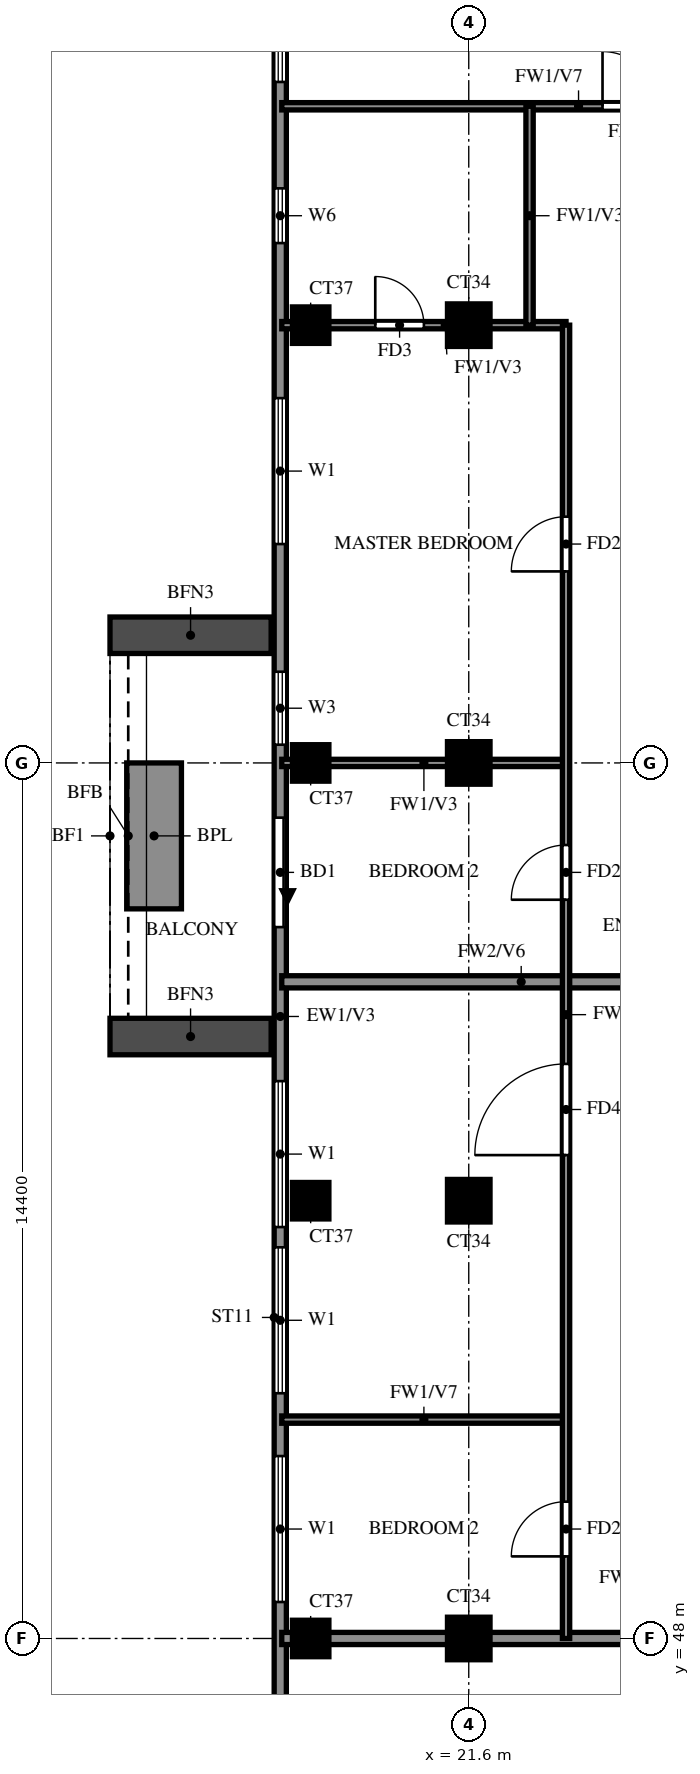
"""IFC4 building model, lengths in metres.
Left out: names, types, materials, properties, quantities, classifications, styles, units other than length and angle.
Written with IfcOpenShell. Run it as: python <this file> out.ifc"""

import sys

from ifc_helpers import new_model, si_unit, direction, frame, frame_2d, origin, origin_2d, place, context, subcontext, project, spatial, rectangle, extrude, source, transform, mapped, element, fill, save


model = new_model("IFC4")
c1 = context("Model", 3, precision=1e-05, world=origin(), true_north=direction((0.0, 1.0)))
c2 = subcontext(c1, "Body", "Model", "MODEL_VIEW")
j1 = project(units=[si_unit("LENGTHUNIT", "METRE"), si_unit("PLANEANGLEUNIT", "RADIAN")], contexts=[c1])
p1 = place(None, origin())
s1 = spatial("IfcSite", under=j1, at=p1, CompositionType="ELEMENT")
p2 = place(p1, origin())
s2 = spatial("IfcBuilding", under=s1, at=p2, CompositionType="ELEMENT")
p3 = place(p2, frame((0.0, 0.0, 253.5)))
s3 = spatial("IfcBuildingStorey", under=s2, at=p3, CompositionType="ELEMENT", Elevation=253.5)
m1 = source(origin(), c2, "Body", "SweptSolid", [
    extrude(rectangle(XDim=0.6, YDim=0.6, at=origin_2d()), origin(), (0.0, 0.0, 1.0), 3.22),
])
p4 = place(p3, frame((19.0, 48.0, 0.0), z_axis=(0.0, 0.0, 1.0), x_axis=(1.0, 0.0, 0.0)))
e1 = element("IfcColumn", 1, at=p4, inside=s3, PredefinedType="COLUMN", context=c2, shape_type="MappedRepresentation", body=[
    mapped(m1, transform((0.0, 0.0, 0.0))),
])
m2 = source(origin(), c2, "Body", "SweptSolid", [
    extrude(rectangle(XDim=0.7, YDim=0.7, at=origin_2d()), origin(), (0.0, 0.0, 1.0), 3.22),
])
p5 = place(p3, frame((21.6, 48.0, 0.0), z_axis=(0.0, 0.0, 1.0), x_axis=(1.0, 0.0, 0.0)))
e2 = element("IfcColumn", 2, at=p5, inside=s3, PredefinedType="COLUMN", context=c2, shape_type="MappedRepresentation", body=[
    mapped(m2, transform((0.0, 0.0, 0.0))),
])
p6 = place(p3, frame((19.0, 55.2, 0.0), z_axis=(0.0, 0.0, 1.0), x_axis=(1.0, 0.0, 0.0)))
e3 = element("IfcColumn", 3, at=p6, inside=s3, PredefinedType="COLUMN", context=c2, shape_type="MappedRepresentation", body=[
    mapped(m1, transform((0.0, 0.0, 0.0))),
])
p7 = place(p3, frame((21.6, 55.2, 0.0), z_axis=(0.0, 0.0, 1.0), x_axis=(1.0, 0.0, 0.0)))
e4 = element("IfcColumn", 4, at=p7, inside=s3, PredefinedType="COLUMN", context=c2, shape_type="MappedRepresentation", body=[
    mapped(m2, transform((0.0, 0.0, 0.0))),
])
p8 = place(p3, frame((19.0, 62.4, 0.0), z_axis=(0.0, 0.0, 1.0), x_axis=(1.0, 0.0, 0.0)))
e5 = element("IfcColumn", 5, at=p8, inside=s3, PredefinedType="COLUMN", context=c2, shape_type="MappedRepresentation", body=[
    mapped(m1, transform((0.0, 0.0, 0.0))),
])
p9 = place(p3, frame((21.6, 62.4, 0.0), z_axis=(0.0, 0.0, 1.0), x_axis=(1.0, 0.0, 0.0)))
e6 = element("IfcColumn", 6, at=p9, inside=s3, PredefinedType="COLUMN", context=c2, shape_type="MappedRepresentation", body=[
    mapped(m2, transform((0.0, 0.0, 0.0))),
])
p10 = place(p3, frame((19.0, 69.6, 0.0), z_axis=(0.0, 0.0, 1.0), x_axis=(1.0, 0.0, 0.0)))
e7 = element("IfcColumn", 7, at=p10, inside=s3, PredefinedType="COLUMN", context=c2, shape_type="MappedRepresentation", body=[
    mapped(m1, transform((0.0, 0.0, 0.0))),
])
p11 = place(p3, frame((21.6, 69.6, 0.0), z_axis=(0.0, 0.0, 1.0), x_axis=(1.0, 0.0, 0.0)))
e8 = element("IfcColumn", 8, at=p11, inside=s3, PredefinedType="COLUMN", context=c2, shape_type="MappedRepresentation", body=[
    mapped(m2, transform((0.0, 0.0, 0.0))),
])
p12 = place(p3, frame((18.5, 76.6, 0.0), z_axis=(0.0, 0.0, 1.0), x_axis=(0.0, -1.0, 0.0)))
e9 = element("IfcWall", 9, at=p12, inside=s3, PredefinedType="SOLIDWALL", context=c2, shape_type="SweptSolid", body=[
    extrude(rectangle(XDim=33.4, YDim=0.2, at=frame_2d((16.7, 0.0))), origin(), (0.0, 0.0, 1.0), 3.22),
])
p13 = place(p12, frame((15.1, 0.0, 0.0)))
e10 = element("IfcOpeningElement", 10, at=p13, cuts=e9, PredefinedType="OPENING", context=c2, shape_type="SweptSolid", body=[
    extrude(rectangle(XDim=1.8, YDim=2.4, at=frame_2d((0.9, 1.2))), frame((0.0, 0.11, 0.0), z_axis=(0.0, -1.0, 0.0), x_axis=(1.0, 0.0, 0.0)), (0.0, 0.0, 1.0), 0.22),
])
p14 = place(p12, frame((29.7, 0.0, 0.6)))
e11 = element("IfcOpeningElement", 11, at=p14, cuts=e9, PredefinedType="OPENING", context=c2, shape_type="SweptSolid", body=[
    extrude(rectangle(XDim=2.4, YDim=2.4, at=frame_2d((1.2, 1.2))), frame((0.0, 0.11, 0.0), z_axis=(0.0, -1.0, 0.0), x_axis=(1.0, 0.0, 0.0)), (0.0, 0.0, 1.0), 0.22),
])
p15 = place(p12, frame((25.6, 0.0, 0.6)))
e12 = element("IfcOpeningElement", 12, at=p15, cuts=e9, PredefinedType="OPENING", context=c2, shape_type="SweptSolid", body=[
    extrude(rectangle(XDim=2.4, YDim=2.4, at=frame_2d((1.2, 1.2))), frame((0.0, 0.11, 0.0), z_axis=(0.0, -1.0, 0.0), x_axis=(1.0, 0.0, 0.0)), (0.0, 0.0, 1.0), 0.22),
])
p16 = place(p12, frame((19.433, 0.0, 0.6)))
e13 = element("IfcOpeningElement", 13, at=p16, cuts=e9, PredefinedType="OPENING", context=c2, shape_type="SweptSolid", body=[
    extrude(rectangle(XDim=2.4, YDim=2.4, at=frame_2d((1.2, 1.2))), frame((0.0, 0.11, 0.0), z_axis=(0.0, -1.0, 0.0), x_axis=(1.0, 0.0, 0.0)), (0.0, 0.0, 1.0), 0.22),
])
p17 = place(p12, frame((22.167, 0.0, 0.6)))
e14 = element("IfcOpeningElement", 14, at=p17, cuts=e9, PredefinedType="OPENING", context=c2, shape_type="SweptSolid", body=[
    extrude(rectangle(XDim=2.4, YDim=2.4, at=frame_2d((1.2, 1.2))), frame((0.0, 0.11, 0.0), z_axis=(0.0, -1.0, 0.0), x_axis=(1.0, 0.0, 0.0)), (0.0, 0.0, 1.0), 0.22),
])
p18 = place(p12, frame((8.2, 0.0, 0.6)))
e15 = element("IfcOpeningElement", 15, at=p18, cuts=e9, PredefinedType="OPENING", context=c2, shape_type="SweptSolid", body=[
    extrude(rectangle(XDim=2.4, YDim=2.4, at=frame_2d((1.2, 1.2))), frame((0.0, 0.11, 0.0), z_axis=(0.0, -1.0, 0.0), x_axis=(1.0, 0.0, 0.0)), (0.0, 0.0, 1.0), 0.22),
])
p19 = place(p12, frame((12.7, 0.0, 0.6)))
e16 = element("IfcOpeningElement", 16, at=p19, cuts=e9, PredefinedType="OPENING", context=c2, shape_type="SweptSolid", body=[
    extrude(rectangle(XDim=1.2, YDim=2.4, at=frame_2d((0.6, 1.2))), frame((0.0, 0.11, 0.0), z_axis=(0.0, -1.0, 0.0), x_axis=(1.0, 0.0, 0.0)), (0.0, 0.0, 1.0), 0.22),
])
p20 = place(p12, frame((4.75, 0.0, 1.5)))
e17 = element("IfcOpeningElement", 17, at=p20, cuts=e9, PredefinedType="OPENING", context=c2, shape_type="SweptSolid", body=[
    extrude(rectangle(XDim=0.9, YDim=0.9, at=frame_2d((0.45, 0.45))), frame((0.0, 0.11, 0.0), z_axis=(0.0, -1.0, 0.0), x_axis=(1.0, 0.0, 0.0)), (0.0, 0.0, 1.0), 0.22),
])
p21 = place(p12, frame((0.6, 0.0, 0.6)))
e18 = element("IfcOpeningElement", 18, at=p21, cuts=e9, PredefinedType="OPENING", context=c2, shape_type="SweptSolid", body=[
    extrude(rectangle(XDim=2.4, YDim=2.4, at=frame_2d((1.2, 1.2))), frame((0.0, 0.11, 0.0), z_axis=(0.0, -1.0, 0.0), x_axis=(1.0, 0.0, 0.0)), (0.0, 0.0, 1.0), 0.22),
])
for number, where, z_axis, x_axis in (
    (19, (18.35, 64.5, 0.0), (0.0, 0.0, 1.0), (-1.0, 0.0, 0.0)),
    (20, (18.35, 57.9, 0.0), (0.0, 0.0, 1.0), (-1.0, 0.0, 0.0)),
):
    element("IfcWall", number, at=place(p3, frame(where, z_axis=z_axis, x_axis=x_axis)), inside=s3, PredefinedType="SOLIDWALL", context=c2, shape_type="SweptSolid", body=[
        extrude(rectangle(XDim=2.65, YDim=0.6, at=frame_2d((1.325, 0.0))), origin(), (0.0, 0.0, 1.0), 2.85),
    ])
p22 = place(p3, frame((16.425, 62.4, 0.0), z_axis=(0.0, 0.0, 1.0), x_axis=(0.0, -1.0, 0.0)))
e21 = element("IfcWall", 21, at=p22, inside=s3, PredefinedType="SOLIDWALL", context=c2, shape_type="SweptSolid", body=[
    extrude(rectangle(XDim=2.4, YDim=0.9, at=frame_2d((1.2, 0.0))), origin(), (0.0, 0.0, 1.0), 0.9),
])
p23 = place(p3, frame((18.525, 48.0, 0.0), z_axis=(0.0, 0.0, 1.0), x_axis=(1.0, 0.0, 0.0)))
e22 = element("IfcWall", 22, at=p23, inside=s3, PredefinedType="SOLIDWALL", context=c2, shape_type="SweptSolid", body=[
    extrude(rectangle(XDim=15.075, YDim=0.2, at=frame_2d((7.538, 0.0))), origin(), (0.0, 0.0, 1.0), 3.22),
])
p24 = place(p3, frame((18.525, 58.8, 0.0), z_axis=(0.0, 0.0, 1.0), x_axis=(1.0, 0.0, 0.0)))
e23 = element("IfcWall", 23, at=p24, inside=s3, PredefinedType="SOLIDWALL", context=c2, shape_type="SweptSolid", body=[
    extrude(rectangle(XDim=7.875, YDim=0.2, at=frame_2d((3.938, 0.0))), origin(), (0.0, 0.0, 1.0), 2.32),
])
p25 = place(p3, frame((18.525, 51.6, 0.0), z_axis=(0.0, 0.0, 1.0), x_axis=(1.0, 0.0, 0.0)))
e24 = element("IfcWall", 24, at=p25, inside=s3, PredefinedType="PARTITIONING", context=c2, shape_type="SweptSolid", body=[
    extrude(rectangle(XDim=4.675, YDim=0.12, at=frame_2d((2.337, 0.0))), origin(), (0.0, 0.0, 1.0), 2.32),
])
p26 = place(p3, frame((18.525, 62.4, 0.0), z_axis=(0.0, 0.0, 1.0), x_axis=(1.0, 0.0, 0.0)))
e25 = element("IfcWall", 25, at=p26, inside=s3, PredefinedType="PARTITIONING", context=c2, shape_type="SweptSolid", body=[
    extrude(rectangle(XDim=4.675, YDim=0.12, at=frame_2d((2.337, 0.0))), origin(), (0.0, 0.0, 1.0), 3.22),
])
p27 = place(p3, frame((18.525, 69.6, 0.0), z_axis=(0.0, 0.0, 1.0), x_axis=(1.0, 0.0, 0.0)))
e26 = element("IfcWall", 26, at=p27, inside=s3, PredefinedType="PARTITIONING", context=c2, shape_type="SweptSolid", body=[
    extrude(rectangle(XDim=4.675, YDim=0.12, at=frame_2d((2.337, 0.0))), origin(), (0.0, 0.0, 1.0), 3.22),
])
p28 = place(p27, frame((1.538, 0.0, 0.0)))
e27 = element("IfcOpeningElement", 27, at=p28, cuts=e26, PredefinedType="OPENING", context=c2, shape_type="SweptSolid", body=[
    extrude(rectangle(XDim=0.8, YDim=2.1, at=frame_2d((0.4, 1.05))), frame((0.0, 0.07, 0.0), z_axis=(0.0, -1.0, 0.0), x_axis=(1.0, 0.0, 0.0)), (0.0, 0.0, 1.0), 0.14),
])
p29 = place(p3, frame((18.525, 73.2, 0.0), z_axis=(0.0, 0.0, 1.0), x_axis=(1.0, 0.0, 0.0)))
e28 = element("IfcWall", 28, at=p29, inside=s3, PredefinedType="PARTITIONING", context=c2, shape_type="SweptSolid", body=[
    extrude(rectangle(XDim=10.275, YDim=0.12, at=frame_2d((5.138, 0.0))), origin(), (0.0, 0.0, 1.0), 2.32),
])
p30 = place(p29, frame((5.275, 0.0, 0.0)))
e29 = element("IfcOpeningElement", 29, at=p30, cuts=e28, PredefinedType="OPENING", context=c2, shape_type="SweptSolid", body=[
    extrude(rectangle(XDim=0.9, YDim=2.1, at=frame_2d((0.45, 1.05))), frame((0.0, 0.07, 0.0), z_axis=(0.0, -1.0, 0.0), x_axis=(1.0, 0.0, 0.0)), (0.0, 0.0, 1.0), 0.14),
])
p31 = place(p3, frame((22.6, 69.6, 0.0), z_axis=(0.0, 0.0, 1.0), x_axis=(0.0, 1.0, 0.0)))
e30 = element("IfcWall", 30, at=p31, inside=s3, PredefinedType="PARTITIONING", context=c2, shape_type="SweptSolid", body=[
    extrude(rectangle(XDim=3.6, YDim=0.12, at=frame_2d((1.8, 0.0))), origin(), (0.0, 0.0, 1.0), 3.22),
])
p32 = place(p3, frame((23.2, 48.0, 0.0), z_axis=(0.0, 0.0, 1.0), x_axis=(0.0, 1.0, 0.0)))
e31 = element("IfcWall", 31, at=p32, inside=s3, PredefinedType="PARTITIONING", context=c2, shape_type="SweptSolid", body=[
    extrude(rectangle(XDim=21.6, YDim=0.12, at=frame_2d((10.8, 0.0))), origin(), (0.0, 0.0, 1.0), 3.22),
])
p33 = place(p32, frame((1.35, 0.0, 0.0)))
e32 = element("IfcOpeningElement", 32, at=p33, cuts=e31, PredefinedType="OPENING", context=c2, shape_type="SweptSolid", body=[
    extrude(rectangle(XDim=0.9, YDim=2.1, at=frame_2d((0.45, 1.05))), frame((0.0, 0.07, 0.0), z_axis=(0.0, -1.0, 0.0), x_axis=(1.0, 0.0, 0.0)), (0.0, 0.0, 1.0), 0.14),
])
p34 = place(p32, frame((7.95, 0.0, 0.0)))
e33 = element("IfcOpeningElement", 33, at=p34, cuts=e31, PredefinedType="OPENING", context=c2, shape_type="SweptSolid", body=[
    extrude(rectangle(XDim=1.5, YDim=2.1, at=frame_2d((0.75, 1.05))), frame((0.0, 0.07, 0.0), z_axis=(0.0, -1.0, 0.0), x_axis=(1.0, 0.0, 0.0)), (0.0, 0.0, 1.0), 0.14),
])
p35 = place(p32, frame((12.15, 0.0, 0.0)))
e34 = element("IfcOpeningElement", 34, at=p35, cuts=e31, PredefinedType="OPENING", context=c2, shape_type="SweptSolid", body=[
    extrude(rectangle(XDim=0.9, YDim=2.1, at=frame_2d((0.45, 1.05))), frame((0.0, 0.07, 0.0), z_axis=(0.0, -1.0, 0.0), x_axis=(1.0, 0.0, 0.0)), (0.0, 0.0, 1.0), 0.14),
])
p36 = place(p32, frame((17.55, 0.0, 0.0)))
e35 = element("IfcOpeningElement", 35, at=p36, cuts=e31, PredefinedType="OPENING", context=c2, shape_type="SweptSolid", body=[
    extrude(rectangle(XDim=0.9, YDim=2.1, at=frame_2d((0.45, 1.05))), frame((0.0, 0.07, 0.0), z_axis=(0.0, -1.0, 0.0), x_axis=(1.0, 0.0, 0.0)), (0.0, 0.0, 1.0), 0.14),
])
p37 = place(p13, origin())
e36 = element("IfcDoor", 36, at=p37, inside=s3, OperationType="DOUBLE_DOOR_SLIDING", PredefinedType="DOOR", context=c2, shape_type="SweptSolid", body=[
    extrude(rectangle(XDim=1.8, YDim=2.4, at=frame_2d((0.9, 1.2))), frame((0.0, 0.025, 0.0), z_axis=(0.0, -1.0, 0.0), x_axis=(1.0, 0.0, 0.0)), (0.0, 0.0, 1.0), 0.05),
])
fill(e10, e36)
p38 = place(p15, origin())
e37 = element("IfcWindow", 37, at=p38, inside=s3, PartitioningType="DOUBLE_PANEL_VERTICAL", PredefinedType="WINDOW", context=c2, shape_type="SweptSolid", body=[
    extrude(rectangle(XDim=2.4, YDim=2.4, at=frame_2d((1.2, 1.2))), frame((0.0, 0.03, 0.0), z_axis=(0.0, -1.0, 0.0), x_axis=(1.0, 0.0, 0.0)), (0.0, 0.0, 1.0), 0.06),
])
fill(e12, e37)
p39 = place(p16, origin())
e38 = element("IfcWindow", 38, at=p39, inside=s3, PartitioningType="DOUBLE_PANEL_VERTICAL", PredefinedType="WINDOW", context=c2, shape_type="SweptSolid", body=[
    extrude(rectangle(XDim=2.4, YDim=2.4, at=frame_2d((1.2, 1.2))), frame((0.0, 0.03, 0.0), z_axis=(0.0, -1.0, 0.0), x_axis=(1.0, 0.0, 0.0)), (0.0, 0.0, 1.0), 0.06),
])
fill(e13, e38)
p40 = place(p17, origin())
e39 = element("IfcWindow", 39, at=p40, inside=s3, PartitioningType="DOUBLE_PANEL_VERTICAL", PredefinedType="WINDOW", context=c2, shape_type="SweptSolid", body=[
    extrude(rectangle(XDim=2.4, YDim=2.4, at=frame_2d((1.2, 1.2))), frame((0.0, 0.03, 0.0), z_axis=(0.0, -1.0, 0.0), x_axis=(1.0, 0.0, 0.0)), (0.0, 0.0, 1.0), 0.06),
])
fill(e14, e39)
p41 = place(p18, origin())
e40 = element("IfcWindow", 40, at=p41, inside=s3, PartitioningType="DOUBLE_PANEL_VERTICAL", PredefinedType="WINDOW", context=c2, shape_type="SweptSolid", body=[
    extrude(rectangle(XDim=2.4, YDim=2.4, at=frame_2d((1.2, 1.2))), frame((0.0, 0.03, 0.0), z_axis=(0.0, -1.0, 0.0), x_axis=(1.0, 0.0, 0.0)), (0.0, 0.0, 1.0), 0.06),
])
fill(e15, e40)
p42 = place(p19, origin())
e41 = element("IfcWindow", 41, at=p42, inside=s3, PartitioningType="SINGLE_PANEL", PredefinedType="WINDOW", context=c2, shape_type="SweptSolid", body=[
    extrude(rectangle(XDim=1.2, YDim=2.4, at=frame_2d((0.6, 1.2))), frame((0.0, 0.03, 0.0), z_axis=(0.0, -1.0, 0.0), x_axis=(1.0, 0.0, 0.0)), (0.0, 0.0, 1.0), 0.06),
])
fill(e16, e41)
p43 = place(p20, origin())
e42 = element("IfcWindow", 42, at=p43, inside=s3, PartitioningType="SINGLE_PANEL", PredefinedType="WINDOW", context=c2, shape_type="SweptSolid", body=[
    extrude(rectangle(XDim=0.9, YDim=0.9, at=frame_2d((0.45, 0.45))), frame((0.0, 0.03, 0.0), z_axis=(0.0, -1.0, 0.0), x_axis=(1.0, 0.0, 0.0)), (0.0, 0.0, 1.0), 0.06),
])
fill(e17, e42)
p44 = place(p21, origin())
e43 = element("IfcWindow", 43, at=p44, inside=s3, PartitioningType="DOUBLE_PANEL_VERTICAL", PredefinedType="WINDOW", context=c2, shape_type="SweptSolid", body=[
    extrude(rectangle(XDim=2.4, YDim=2.4, at=frame_2d((1.2, 1.2))), frame((0.0, 0.03, 0.0), z_axis=(0.0, -1.0, 0.0), x_axis=(1.0, 0.0, 0.0)), (0.0, 0.0, 1.0), 0.06),
])
fill(e18, e43)
p45 = place(p33, origin())
e44 = element("IfcDoor", 44, at=p45, inside=s3, OperationType="SINGLE_SWING_RIGHT", PredefinedType="DOOR", context=c2, shape_type="SweptSolid", body=[
    extrude(rectangle(XDim=0.9, YDim=2.1, at=frame_2d((0.45, 1.05))), frame((0.0, 0.025, 0.0), z_axis=(0.0, -1.0, 0.0), x_axis=(1.0, 0.0, 0.0)), (0.0, 0.0, 1.0), 0.05),
])
fill(e32, e44)
p46 = place(p34, origin())
e45 = element("IfcDoor", 45, at=p46, inside=s3, OperationType="SINGLE_SWING_RIGHT", PredefinedType="DOOR", context=c2, shape_type="SweptSolid", body=[
    extrude(rectangle(XDim=1.5, YDim=2.1, at=frame_2d((0.75, 1.05))), frame((0.0, 0.025, 0.0), z_axis=(0.0, -1.0, 0.0), x_axis=(1.0, 0.0, 0.0)), (0.0, 0.0, 1.0), 0.05),
])
fill(e33, e45)
p47 = place(p35, origin())
e46 = element("IfcDoor", 46, at=p47, inside=s3, OperationType="SINGLE_SWING_LEFT", PredefinedType="DOOR", context=c2, shape_type="SweptSolid", body=[
    extrude(rectangle(XDim=0.9, YDim=2.1, at=frame_2d((0.45, 1.05))), frame((0.0, 0.025, 0.0), z_axis=(0.0, -1.0, 0.0), x_axis=(1.0, 0.0, 0.0)), (0.0, 0.0, 1.0), 0.05),
])
fill(e34, e46)
p48 = place(p36, origin())
e47 = element("IfcDoor", 47, at=p48, inside=s3, OperationType="SINGLE_SWING_RIGHT", PredefinedType="DOOR", context=c2, shape_type="SweptSolid", body=[
    extrude(rectangle(XDim=0.9, YDim=2.1, at=frame_2d((0.45, 1.05))), frame((0.0, 0.025, 0.0), z_axis=(0.0, -1.0, 0.0), x_axis=(1.0, 0.0, 0.0)), (0.0, 0.0, 1.0), 0.05),
])
fill(e35, e47)
p49 = place(p28, origin())
e48 = element("IfcDoor", 48, at=p49, inside=s3, OperationType="SINGLE_SWING_RIGHT", PredefinedType="DOOR", context=c2, shape_type="SweptSolid", body=[
    extrude(rectangle(XDim=0.8, YDim=2.1, at=frame_2d((0.4, 1.05))), frame((0.0, 0.025, 0.0), z_axis=(0.0, -1.0, 0.0), x_axis=(1.0, 0.0, 0.0)), (0.0, 0.0, 1.0), 0.05),
])
fill(e27, e48)
p50 = place(p30, origin())
e49 = element("IfcDoor", 49, at=p50, inside=s3, OperationType="SINGLE_SWING_LEFT", PredefinedType="DOOR", context=c2, shape_type="SweptSolid", body=[
    extrude(rectangle(XDim=0.9, YDim=2.1, at=frame_2d((0.45, 1.05))), frame((0.0, 0.025, 0.0), z_axis=(0.0, -1.0, 0.0), x_axis=(1.0, 0.0, 0.0)), (0.0, 0.0, 1.0), 0.05),
])
fill(e29, e49)
save(model, sys.argv[1])
